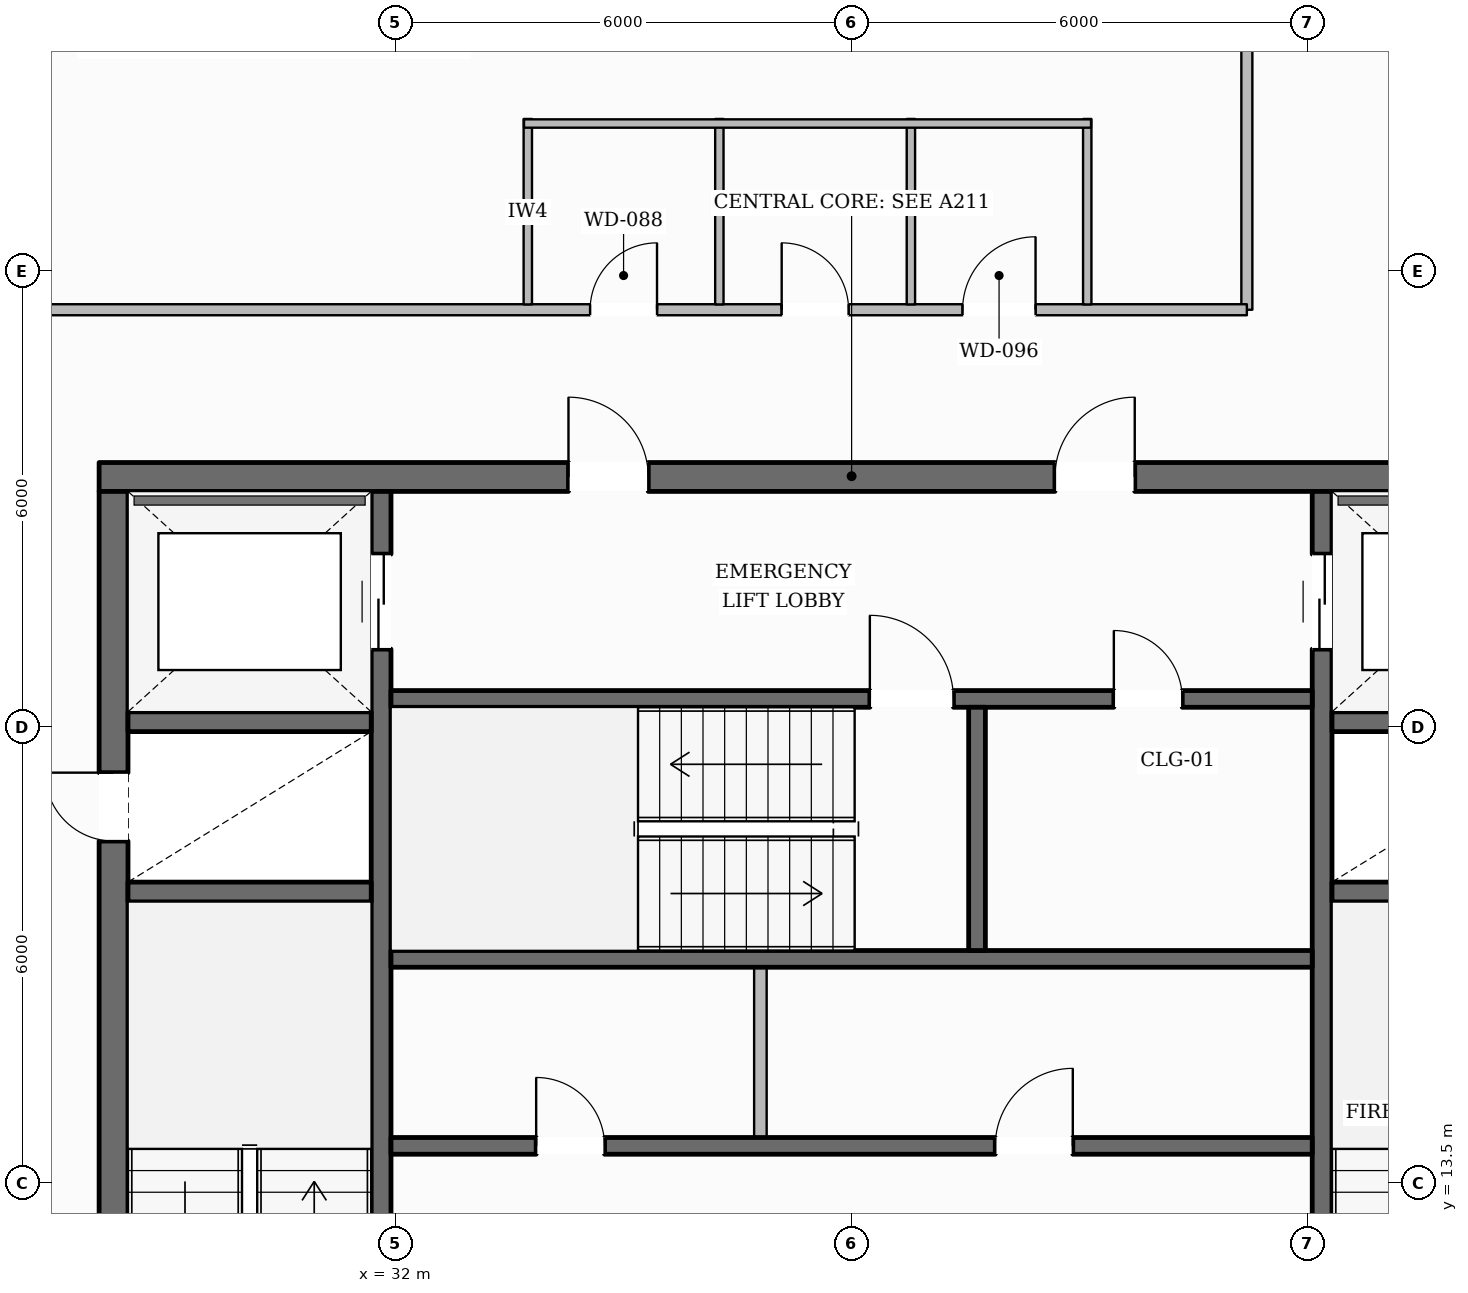
"""IFC4 building model, lengths in metres.
Left out: names, types, materials, properties, quantities, classifications, styles, units other than length and angle.
Written with IfcOpenShell. Run it as: python <this file> out.ifc"""

import sys

from ifc_helpers import new_model, si_unit, direction, frame, frame_2d, origin, place, context, subcontext, project, spatial, rectangle, extrude, element, fill, save


model = new_model("IFC4")
c1 = context("Model", 3, precision=1e-05, world=origin(), true_north=direction((0.0, 1.0)))
c2 = subcontext(c1, "Body", "Model", "MODEL_VIEW")
j1 = project(units=[si_unit("LENGTHUNIT", "METRE"), si_unit("PLANEANGLEUNIT", "RADIAN")], contexts=[c1])
p1 = place(None, origin())
s1 = spatial("IfcSite", under=j1, at=p1, CompositionType="ELEMENT")
p2 = place(p1, origin())
s2 = spatial("IfcBuilding", under=s1, at=p2, CompositionType="ELEMENT")
p3 = place(p2, frame((0.0, 0.0, 274.15)))
s3 = spatial("IfcBuildingStorey", under=s2, at=p3, CompositionType="ELEMENT", Elevation=274.15)
p4 = place(p3, frame((28.1, 22.79, 0.0), z_axis=(0.0, 0.0, 1.0), x_axis=(1.0, 0.0, 0.0)))
e1 = element("IfcWall", 1, at=p4, inside=s3, PredefinedType="SOLIDWALL", context=c2, shape_type="SweptSolid", body=[
    extrude(rectangle(XDim=19.8, YDim=0.38, at=frame_2d((9.9, 0.0))), origin(), (0.0, 0.0, 1.0), 3.61),
])
p5 = place(p4, frame((6.175, 0.0, 0.0)))
e2 = element("IfcOpeningElement", 2, at=p5, cuts=e1, PredefinedType="OPENING", context=c2, shape_type="SweptSolid", body=[
    extrude(rectangle(XDim=1.05, YDim=2.15, at=frame_2d((0.525, 1.075))), frame((0.0, 0.2, 0.0), z_axis=(0.0, -1.0, 0.0), x_axis=(1.0, 0.0, 0.0)), (0.0, 0.0, 1.0), 0.4),
])
p6 = place(p4, frame((12.575, 0.0, 0.0)))
e3 = element("IfcOpeningElement", 3, at=p6, cuts=e1, PredefinedType="OPENING", context=c2, shape_type="SweptSolid", body=[
    extrude(rectangle(XDim=1.05, YDim=2.15, at=frame_2d((0.525, 1.075))), frame((0.0, 0.2, 0.0), z_axis=(0.0, -1.0, 0.0), x_axis=(1.0, 0.0, 0.0)), (0.0, 0.0, 1.0), 0.4),
])
p7 = place(p3, frame((28.29, 9.6, 0.0), z_axis=(0.0, 0.0, 1.0), x_axis=(0.0, 1.0, 0.0)))
e4 = element("IfcWall", 4, at=p7, inside=s3, PredefinedType="SOLIDWALL", context=c2, shape_type="SweptSolid", body=[
    extrude(rectangle(XDim=13.0, YDim=0.38, at=frame_2d((6.5, 0.0))), origin(), (0.0, 0.0, 1.0), 3.61),
])
p8 = place(p7, frame((0.2, 0.0, 0.0)))
e5 = element("IfcOpeningElement", 5, at=p8, cuts=e4, PredefinedType="OPENING", context=c2, shape_type="SweptSolid", body=[
    extrude(rectangle(XDim=1.1, YDim=2.15, at=frame_2d((0.55, 1.075))), frame((0.0, 0.2, 0.0), z_axis=(0.0, -1.0, 0.0), x_axis=(1.0, 0.0, 0.0)), (0.0, 0.0, 1.0), 0.4),
])
p9 = place(p7, frame((8.4, 0.0, 0.0)))
e6 = element("IfcOpeningElement", 6, at=p9, cuts=e4, PredefinedType="OPENING", context=c2, shape_type="SweptSolid", body=[
    extrude(rectangle(XDim=0.9, YDim=2.1, at=frame_2d((0.45, 1.05))), frame((0.0, 0.2, 0.0), z_axis=(0.0, -1.0, 0.0), x_axis=(1.0, 0.0, 0.0)), (0.0, 0.0, 1.0), 0.4),
])
p10 = place(p3, frame((31.81, 9.6, 0.0), z_axis=(0.0, 0.0, 1.0), x_axis=(0.0, 1.0, 0.0)))
e7 = element("IfcWall", 7, at=p10, inside=s3, PredefinedType="SHEAR", context=c2, shape_type="SweptSolid", body=[
    extrude(rectangle(XDim=13.0, YDim=0.26, at=frame_2d((6.5, 0.0))), origin(), (0.0, 0.0, 1.0), 3.61),
])
p11 = place(p10, frame((10.925, 0.0, 0.0)))
e8 = element("IfcOpeningElement", 8, at=p11, cuts=e7, PredefinedType="OPENING", context=c2, shape_type="SweptSolid", body=[
    extrude(rectangle(XDim=1.25, YDim=2.25, at=frame_2d((0.625, 1.125))), frame((0.0, 0.14, 0.0), z_axis=(0.0, -1.0, 0.0), x_axis=(1.0, 0.0, 0.0)), (0.0, 0.0, 1.0), 0.28),
])
p12 = place(p3, frame((44.19, 9.6, 0.0), z_axis=(0.0, 0.0, 1.0), x_axis=(0.0, 1.0, 0.0)))
e9 = element("IfcWall", 9, at=p12, inside=s3, PredefinedType="SHEAR", context=c2, shape_type="SweptSolid", body=[
    extrude(rectangle(XDim=13.0, YDim=0.26, at=frame_2d((6.5, 0.0))), origin(), (0.0, 0.0, 1.0), 3.61),
])
p13 = place(p12, frame((10.925, 0.0, 0.0)))
e10 = element("IfcOpeningElement", 10, at=p13, cuts=e9, PredefinedType="OPENING", context=c2, shape_type="SweptSolid", body=[
    extrude(rectangle(XDim=1.25, YDim=2.25, at=frame_2d((0.625, 1.125))), frame((0.0, 0.14, 0.0), z_axis=(0.0, -1.0, 0.0), x_axis=(1.0, 0.0, 0.0)), (0.0, 0.0, 1.0), 0.28),
])
for number, where, z_axis, x_axis in (
    (11, (28.48, 17.33, 0.0), (0.0, 0.0, 1.0), (1.0, 0.0, 0.0)),
    (12, (28.48, 19.57, 0.0), (0.0, 0.0, 1.0), (1.0, 0.0, 0.0)),
    (13, (44.32, 17.33, 0.0), (0.0, 0.0, 1.0), (1.0, 0.0, 0.0)),
    (14, (44.32, 19.57, 0.0), (0.0, 0.0, 1.0), (1.0, 0.0, 0.0)),
):
    element("IfcWall", number, at=place(p3, frame(where, z_axis=z_axis, x_axis=x_axis)), inside=s3, PredefinedType="SHEAR", context=c2, shape_type="SweptSolid", body=[
        extrude(rectangle(XDim=3.2, YDim=0.26, at=frame_2d((1.6, 0.0))), origin(), (0.0, 0.0, 1.0), 3.61),
    ])
p14 = place(p3, frame((31.94, 19.87, 0.0), z_axis=(0.0, 0.0, 1.0), x_axis=(1.0, 0.0, 0.0)))
e15 = element("IfcWall", 15, at=p14, inside=s3, PredefinedType="SOLIDWALL", context=c2, shape_type="SweptSolid", body=[
    extrude(rectangle(XDim=12.12, YDim=0.22, at=frame_2d((6.06, 0.0))), origin(), (0.0, 0.0, 1.0), 3.61),
])
p15 = place(p14, frame((6.3, 0.0, 0.0)))
e16 = element("IfcOpeningElement", 16, at=p15, cuts=e15, PredefinedType="OPENING", context=c2, shape_type="SweptSolid", body=[
    extrude(rectangle(XDim=1.1, YDim=2.15, at=frame_2d((0.55, 1.075))), frame((0.0, 0.12, 0.0), z_axis=(0.0, -1.0, 0.0), x_axis=(1.0, 0.0, 0.0)), (0.0, 0.0, 1.0), 0.24),
])
p16 = place(p14, frame((9.51, 0.0, 0.0)))
e17 = element("IfcOpeningElement", 17, at=p16, cuts=e15, PredefinedType="OPENING", context=c2, shape_type="SweptSolid", body=[
    extrude(rectangle(XDim=0.9, YDim=2.1, at=frame_2d((0.45, 1.05))), frame((0.0, 0.12, 0.0), z_axis=(0.0, -1.0, 0.0), x_axis=(1.0, 0.0, 0.0)), (0.0, 0.0, 1.0), 0.24),
])
p17 = place(p3, frame((31.94, 16.45, 0.0), z_axis=(0.0, 0.0, 1.0), x_axis=(1.0, 0.0, 0.0)))
e18 = element("IfcWall", 18, at=p17, inside=s3, PredefinedType="SOLIDWALL", context=c2, shape_type="SweptSolid", body=[
    extrude(rectangle(XDim=12.12, YDim=0.22, at=frame_2d((6.06, 0.0))), origin(), (0.0, 0.0, 1.0), 3.61),
])
p18 = place(p3, frame((39.65, 16.56, 0.0), z_axis=(0.0, 0.0, 1.0), x_axis=(0.0, 1.0, 0.0)))
e19 = element("IfcWall", 19, at=p18, inside=s3, PredefinedType="SOLIDWALL", context=c2, shape_type="SweptSolid", body=[
    extrude(rectangle(XDim=3.2, YDim=0.22, at=frame_2d((1.6, 0.0))), origin(), (0.0, 0.0, 1.0), 3.61),
])
p19 = place(p3, frame((31.94, 13.99, 0.0), z_axis=(0.0, 0.0, 1.0), x_axis=(1.0, 0.0, 0.0)))
e20 = element("IfcWall", 20, at=p19, inside=s3, PredefinedType="SOLIDWALL", context=c2, shape_type="SweptSolid", body=[
    extrude(rectangle(XDim=12.12, YDim=0.22, at=frame_2d((6.06, 0.0))), origin(), (0.0, 0.0, 1.0), 3.61),
])
p20 = place(p19, frame((1.91, 0.0, 0.0)))
e21 = element("IfcOpeningElement", 21, at=p20, cuts=e20, PredefinedType="OPENING", context=c2, shape_type="SweptSolid", body=[
    extrude(rectangle(XDim=0.9, YDim=2.1, at=frame_2d((0.45, 1.05))), frame((0.0, 0.12, 0.0), z_axis=(0.0, -1.0, 0.0), x_axis=(1.0, 0.0, 0.0)), (0.0, 0.0, 1.0), 0.24),
])
p21 = place(p19, frame((7.95, 0.0, 0.0)))
e22 = element("IfcOpeningElement", 22, at=p21, cuts=e20, PredefinedType="OPENING", context=c2, shape_type="SweptSolid", body=[
    extrude(rectangle(XDim=1.02, YDim=2.15, at=frame_2d((0.51, 1.075))), frame((0.0, 0.12, 0.0), z_axis=(0.0, -1.0, 0.0), x_axis=(1.0, 0.0, 0.0)), (0.0, 0.0, 1.0), 0.24),
])
p22 = place(p3, frame((15.485, 10.343, 0.0), z_axis=(0.0, 0.0, 1.0), x_axis=(0.508715156146, 0.860934892955, 0.0)))
e23 = element("IfcWall", 23, at=p22, inside=s3, PredefinedType="STANDARD", context=c2, shape_type="SweptSolid", body=[
    extrude(rectangle(XDim=38.349, YDim=0.35, at=frame_2d((19.175, 0.0))), origin(), (0.0, 0.0, 1.0), 3.196),
])
p23 = place(p22, frame((34.084, 0.0, 0.65)))
e24 = element("IfcOpeningElement", 24, at=p23, cuts=e23, PredefinedType="OPENING", context=c2, shape_type="SweptSolid", body=[
    extrude(rectangle(XDim=1.35, YDim=1.75, at=frame_2d((0.675, 0.875))), frame((0.0, 0.185, 0.0), z_axis=(0.0, -1.0, 0.0), x_axis=(1.0, 0.0, 0.0)), (0.0, 0.0, 1.0), 0.37),
])
p24 = place(p22, frame((27.852, 0.0, 0.65)))
e25 = element("IfcOpeningElement", 25, at=p24, cuts=e23, PredefinedType="OPENING", context=c2, shape_type="SweptSolid", body=[
    extrude(rectangle(XDim=1.35, YDim=1.75, at=frame_2d((0.675, 0.875))), frame((0.0, 0.185, 0.0), z_axis=(0.0, -1.0, 0.0), x_axis=(1.0, 0.0, 0.0)), (0.0, 0.0, 1.0), 0.37),
])
p25 = place(p22, frame((15.388, 0.0, 0.65)))
e26 = element("IfcOpeningElement", 26, at=p25, cuts=e23, PredefinedType="OPENING", context=c2, shape_type="SweptSolid", body=[
    extrude(rectangle(XDim=1.35, YDim=1.75, at=frame_2d((0.675, 0.875))), frame((0.0, 0.185, 0.0), z_axis=(0.0, -1.0, 0.0), x_axis=(1.0, 0.0, 0.0)), (0.0, 0.0, 1.0), 0.37),
])
p26 = place(p22, frame((9.156, 0.0, 0.65)))
e27 = element("IfcOpeningElement", 27, at=p26, cuts=e23, PredefinedType="OPENING", context=c2, shape_type="SweptSolid", body=[
    extrude(rectangle(XDim=1.35, YDim=1.75, at=frame_2d((0.675, 0.875))), frame((0.0, 0.185, 0.0), z_axis=(0.0, -1.0, 0.0), x_axis=(1.0, 0.0, 0.0)), (0.0, 0.0, 1.0), 0.37),
])
p27 = place(p22, frame((2.925, 0.0, 0.65)))
e28 = element("IfcOpeningElement", 28, at=p27, cuts=e23, PredefinedType="OPENING", context=c2, shape_type="SweptSolid", body=[
    extrude(rectangle(XDim=1.35, YDim=1.75, at=frame_2d((0.675, 0.875))), frame((0.0, 0.185, 0.0), z_axis=(0.0, -1.0, 0.0), x_axis=(1.0, 0.0, 0.0)), (0.0, 0.0, 1.0), 0.37),
])
p28 = place(p3, frame((41.006, 43.359, 0.0), z_axis=(0.0, 0.0, 1.0), x_axis=(0.508715156146, -0.860934892955, 0.0)))
e29 = element("IfcWall", 29, at=p28, inside=s3, PredefinedType="STANDARD", context=c2, shape_type="SweptSolid", body=[
    extrude(rectangle(XDim=38.349, YDim=0.35, at=frame_2d((19.175, 0.0))), origin(), (0.0, 0.0, 1.0), 3.196),
])
p29 = place(p28, frame((34.074, 0.0, 0.65)))
e30 = element("IfcOpeningElement", 30, at=p29, cuts=e29, PredefinedType="OPENING", context=c2, shape_type="SweptSolid", body=[
    extrude(rectangle(XDim=1.35, YDim=1.75, at=frame_2d((0.675, 0.875))), frame((0.0, 0.185, 0.0), z_axis=(0.0, -1.0, 0.0), x_axis=(1.0, 0.0, 0.0)), (0.0, 0.0, 1.0), 0.37),
])
p30 = place(p28, frame((27.843, 0.0, 0.65)))
e31 = element("IfcOpeningElement", 31, at=p30, cuts=e29, PredefinedType="OPENING", context=c2, shape_type="SweptSolid", body=[
    extrude(rectangle(XDim=1.35, YDim=1.75, at=frame_2d((0.675, 0.875))), frame((0.0, 0.185, 0.0), z_axis=(0.0, -1.0, 0.0), x_axis=(1.0, 0.0, 0.0)), (0.0, 0.0, 1.0), 0.37),
])
p31 = place(p28, frame((15.379, 0.0, 0.65)))
e32 = element("IfcOpeningElement", 32, at=p31, cuts=e29, PredefinedType="OPENING", context=c2, shape_type="SweptSolid", body=[
    extrude(rectangle(XDim=1.35, YDim=1.75, at=frame_2d((0.675, 0.875))), frame((0.0, 0.185, 0.0), z_axis=(0.0, -1.0, 0.0), x_axis=(1.0, 0.0, 0.0)), (0.0, 0.0, 1.0), 0.37),
])
p32 = place(p28, frame((9.147, 0.0, 0.65)))
e33 = element("IfcOpeningElement", 33, at=p32, cuts=e29, PredefinedType="OPENING", context=c2, shape_type="SweptSolid", body=[
    extrude(rectangle(XDim=1.35, YDim=1.75, at=frame_2d((0.675, 0.875))), frame((0.0, 0.185, 0.0), z_axis=(0.0, -1.0, 0.0), x_axis=(1.0, 0.0, 0.0)), (0.0, 0.0, 1.0), 0.37),
])
p33 = place(p28, frame((2.915, 0.0, 0.65)))
e34 = element("IfcOpeningElement", 34, at=p33, cuts=e29, PredefinedType="OPENING", context=c2, shape_type="SweptSolid", body=[
    extrude(rectangle(XDim=1.35, YDim=1.75, at=frame_2d((0.675, 0.875))), frame((0.0, 0.185, 0.0), z_axis=(0.0, -1.0, 0.0), x_axis=(1.0, 0.0, 0.0)), (0.0, 0.0, 1.0), 0.37),
])
p34 = place(p3, frame((36.8, 14.1, 0.0), z_axis=(0.0, 0.0, 1.0), x_axis=(0.0, 1.0, 0.0)))
e35 = element("IfcWall", 35, at=p34, inside=s3, PredefinedType="PARTITIONING", context=c2, shape_type="SweptSolid", body=[
    extrude(rectangle(XDim=2.24, YDim=0.165, at=frame_2d((1.12, 0.0))), origin(), (0.0, 0.0, 1.0), 3.61),
])
p35 = place(p3, frame((43.2, 24.99, 0.0), z_axis=(0.0, 0.0, 1.0), x_axis=(0.0, 1.0, 0.0)))
e36 = element("IfcWall", 36, at=p35, inside=s3, PredefinedType="PARTITIONING", context=c2, shape_type="SweptSolid", body=[
    extrude(rectangle(XDim=8.641, YDim=0.145, at=frame_2d((4.321, 0.0))), origin(), (0.0, 0.0, 1.0), 3.61),
])
p36 = place(p35, frame((3.621, 0.0, 0.0)))
e37 = element("IfcOpeningElement", 37, at=p36, cuts=e36, PredefinedType="OPENING", context=c2, shape_type="SweptSolid", body=[
    extrude(rectangle(XDim=1.4, YDim=2.2, at=frame_2d((0.7, 1.1))), frame((0.0, 0.083, 0.0), z_axis=(0.0, -1.0, 0.0), x_axis=(1.0, 0.0, 0.0)), (0.0, 0.0, 1.0), 0.165),
])
p37 = place(p3, frame((26.09, 24.99, 0.0), z_axis=(0.0, 0.0, 1.0), x_axis=(1.0, 0.0, 0.0)))
e38 = element("IfcWall", 38, at=p37, inside=s3, PredefinedType="PARTITIONING", context=c2, shape_type="SweptSolid", body=[
    extrude(rectangle(XDim=17.11, YDim=0.145, at=frame_2d((8.555, 0.0))), origin(), (0.0, 0.0, 1.0), 3.61),
])
p38 = place(p37, frame((8.47, 0.0, 0.0)))
e39 = element("IfcOpeningElement", 39, at=p38, cuts=e38, PredefinedType="OPENING", context=c2, shape_type="SweptSolid", body=[
    extrude(rectangle(XDim=0.88, YDim=2.1, at=frame_2d((0.44, 1.05))), frame((0.0, 0.083, 0.0), z_axis=(0.0, -1.0, 0.0), x_axis=(1.0, 0.0, 0.0)), (0.0, 0.0, 1.0), 0.165),
])
p39 = place(p37, frame((10.99, 0.0, 0.0)))
e40 = element("IfcOpeningElement", 40, at=p39, cuts=e38, PredefinedType="OPENING", context=c2, shape_type="SweptSolid", body=[
    extrude(rectangle(XDim=0.88, YDim=2.1, at=frame_2d((0.44, 1.05))), frame((0.0, 0.083, 0.0), z_axis=(0.0, -1.0, 0.0), x_axis=(1.0, 0.0, 0.0)), (0.0, 0.0, 1.0), 0.165),
])
p40 = place(p37, frame((13.37, 0.0, 0.0)))
e41 = element("IfcOpeningElement", 41, at=p40, cuts=e38, PredefinedType="OPENING", context=c2, shape_type="SweptSolid", body=[
    extrude(rectangle(XDim=0.96, YDim=2.1, at=frame_2d((0.48, 1.05))), frame((0.0, 0.083, 0.0), z_axis=(0.0, -1.0, 0.0), x_axis=(1.0, 0.0, 0.0)), (0.0, 0.0, 1.0), 0.165),
])
for number, where, z_axis, x_axis in (
    (42, (33.74, 25.06, 0.0), (0.0, 0.0, 1.0), (0.0, 1.0, 0.0)),
    (43, (36.26, 25.06, 0.0), (0.0, 0.0, 1.0), (0.0, 1.0, 0.0)),
    (44, (38.78, 25.06, 0.0), (0.0, 0.0, 1.0), (0.0, 1.0, 0.0)),
):
    element("IfcWall", number, at=place(p3, frame(where, z_axis=z_axis, x_axis=x_axis)), inside=s3, PredefinedType="PLUMBINGWALL", context=c2, shape_type="SweptSolid", body=[
        extrude(rectangle(XDim=2.44, YDim=0.11, at=frame_2d((1.22, 0.0))), origin(), (0.0, 0.0, 1.0), 3.61),
    ])
p41 = place(p3, frame((41.1, 25.06, 0.0), z_axis=(0.0, 0.0, 1.0), x_axis=(0.0, 1.0, 0.0)))
e45 = element("IfcWall", 45, at=p41, inside=s3, PredefinedType="PLUMBINGWALL", context=c2, shape_type="SweptSolid", body=[
    extrude(rectangle(XDim=2.44, YDim=0.11, at=frame_2d((1.22, 0.0))), origin(), (0.0, 0.0, 1.0), 3.246),
])
p42 = place(p3, frame((33.69, 27.44, 0.0), z_axis=(0.0, 0.0, 1.0), x_axis=(1.0, 0.0, 0.0)))
e46 = element("IfcWall", 46, at=p42, inside=s3, PredefinedType="PLUMBINGWALL", context=c2, shape_type="SweptSolid", body=[
    extrude(rectangle(XDim=7.46, YDim=0.11, at=frame_2d((3.73, 0.0))), origin(), (0.0, 0.0, 1.0), 3.61),
])
p43 = place(p15, origin())
e47 = element("IfcDoor", 47, at=p43, inside=s3, OperationType="SINGLE_SWING_LEFT", PredefinedType="DOOR", context=c2, shape_type="SweptSolid", body=[
    extrude(rectangle(XDim=1.1, YDim=2.15, at=frame_2d((0.55, 1.075))), frame((0.0, 0.025, 0.0), z_axis=(0.0, -1.0, 0.0), x_axis=(1.0, 0.0, 0.0)), (0.0, 0.0, 1.0), 0.05),
])
fill(e16, e47)
p44 = place(p9, origin())
e48 = element("IfcDoor", 48, at=p44, inside=s3, OperationType="SINGLE_SWING_RIGHT", PredefinedType="DOOR", context=c2, shape_type="SweptSolid", body=[
    extrude(rectangle(XDim=0.9, YDim=2.1, at=frame_2d((0.45, 1.05))), frame((0.0, 0.025, 0.0), z_axis=(0.0, -1.0, 0.0), x_axis=(1.0, 0.0, 0.0)), (0.0, 0.0, 1.0), 0.05),
])
fill(e6, e48)
p45 = place(p5, origin())
e49 = element("IfcDoor", 49, at=p45, inside=s3, OperationType="SINGLE_SWING_LEFT", PredefinedType="DOOR", context=c2, shape_type="SweptSolid", body=[
    extrude(rectangle(XDim=1.05, YDim=2.15, at=frame_2d((0.525, 1.075))), frame((0.0, 0.025, 0.0), z_axis=(0.0, -1.0, 0.0), x_axis=(1.0, 0.0, 0.0)), (0.0, 0.0, 1.0), 0.05),
])
fill(e2, e49)
p46 = place(p6, origin())
e50 = element("IfcDoor", 50, at=p46, inside=s3, OperationType="SINGLE_SWING_RIGHT", PredefinedType="DOOR", context=c2, shape_type="SweptSolid", body=[
    extrude(rectangle(XDim=1.05, YDim=2.15, at=frame_2d((0.525, 1.075))), frame((0.0, 0.025, 0.0), z_axis=(0.0, -1.0, 0.0), x_axis=(1.0, 0.0, 0.0)), (0.0, 0.0, 1.0), 0.05),
])
fill(e3, e50)
p47 = place(p11, origin())
e51 = element("IfcDoor", 51, at=p47, inside=s3, OperationType="DOUBLE_DOOR_SLIDING", PredefinedType="DOOR", context=c2, shape_type="SweptSolid", body=[
    extrude(rectangle(XDim=1.25, YDim=2.25, at=frame_2d((0.625, 1.125))), frame((0.0, 0.025, 0.0), z_axis=(0.0, -1.0, 0.0), x_axis=(1.0, 0.0, 0.0)), (0.0, 0.0, 1.0), 0.05),
])
fill(e8, e51)
p48 = place(p13, origin())
e52 = element("IfcDoor", 52, at=p48, inside=s3, OperationType="DOUBLE_DOOR_SLIDING", PredefinedType="DOOR", context=c2, shape_type="SweptSolid", body=[
    extrude(rectangle(XDim=1.25, YDim=2.25, at=frame_2d((0.625, 1.125))), frame((0.0, 0.025, 0.0), z_axis=(0.0, -1.0, 0.0), x_axis=(1.0, 0.0, 0.0)), (0.0, 0.0, 1.0), 0.05),
])
fill(e10, e52)
p49 = place(p20, origin())
e53 = element("IfcDoor", 53, at=p49, inside=s3, OperationType="SINGLE_SWING_LEFT", PredefinedType="DOOR", context=c2, shape_type="SweptSolid", body=[
    extrude(rectangle(XDim=0.9, YDim=2.1, at=frame_2d((0.45, 1.05))), frame((0.0, 0.025, 0.0), z_axis=(0.0, -1.0, 0.0), x_axis=(1.0, 0.0, 0.0)), (0.0, 0.0, 1.0), 0.05),
])
fill(e21, e53)
p50 = place(p21, origin())
e54 = element("IfcDoor", 54, at=p50, inside=s3, OperationType="SINGLE_SWING_RIGHT", PredefinedType="DOOR", context=c2, shape_type="SweptSolid", body=[
    extrude(rectangle(XDim=1.02, YDim=2.15, at=frame_2d((0.51, 1.075))), frame((0.0, 0.025, 0.0), z_axis=(0.0, -1.0, 0.0), x_axis=(1.0, 0.0, 0.0)), (0.0, 0.0, 1.0), 0.05),
])
fill(e22, e54)
p51 = place(p16, origin())
e55 = element("IfcDoor", 55, at=p51, inside=s3, OperationType="SINGLE_SWING_LEFT", PredefinedType="DOOR", context=c2, shape_type="SweptSolid", body=[
    extrude(rectangle(XDim=0.9, YDim=2.1, at=frame_2d((0.45, 1.05))), frame((0.0, 0.025, 0.0), z_axis=(0.0, -1.0, 0.0), x_axis=(1.0, 0.0, 0.0)), (0.0, 0.0, 1.0), 0.05),
])
fill(e17, e55)
p52 = place(p38, origin())
e56 = element("IfcDoor", 56, at=p52, inside=s3, OperationType="SINGLE_SWING_RIGHT", PredefinedType="DOOR", context=c2, shape_type="SweptSolid", body=[
    extrude(rectangle(XDim=0.88, YDim=2.1, at=frame_2d((0.44, 1.05))), frame((0.0, 0.025, 0.0), z_axis=(0.0, -1.0, 0.0), x_axis=(1.0, 0.0, 0.0)), (0.0, 0.0, 1.0), 0.05),
])
fill(e39, e56)
p53 = place(p39, origin())
e57 = element("IfcDoor", 57, at=p53, inside=s3, OperationType="SINGLE_SWING_LEFT", PredefinedType="DOOR", context=c2, shape_type="SweptSolid", body=[
    extrude(rectangle(XDim=0.88, YDim=2.1, at=frame_2d((0.44, 1.05))), frame((0.0, 0.025, 0.0), z_axis=(0.0, -1.0, 0.0), x_axis=(1.0, 0.0, 0.0)), (0.0, 0.0, 1.0), 0.05),
])
fill(e40, e57)
p54 = place(p40, origin())
e58 = element("IfcDoor", 58, at=p54, inside=s3, OperationType="SINGLE_SWING_RIGHT", PredefinedType="DOOR", context=c2, shape_type="SweptSolid", body=[
    extrude(rectangle(XDim=0.96, YDim=2.1, at=frame_2d((0.48, 1.05))), frame((0.0, 0.025, 0.0), z_axis=(0.0, -1.0, 0.0), x_axis=(1.0, 0.0, 0.0)), (0.0, 0.0, 1.0), 0.05),
])
fill(e41, e58)
save(model, sys.argv[1])
